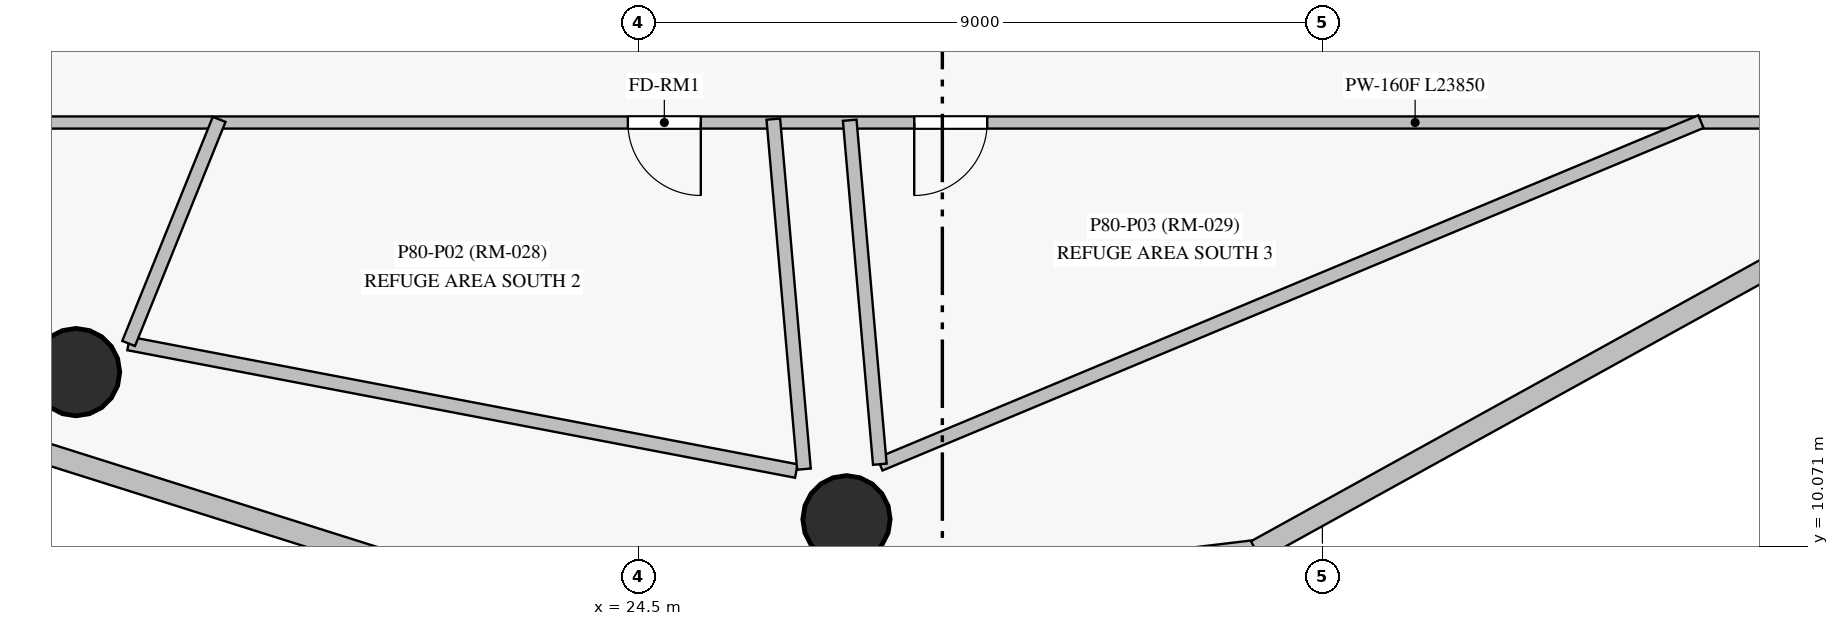
"""IFC4 building model, lengths in metres.
Left out: names, types, materials, properties, quantities, classifications, styles, units other than length and angle.
Written with IfcOpenShell. Run it as: python <this file> out.ifc"""

import sys

from ifc_helpers import new_model, si_unit, direction, frame, frame_2d, origin, origin_with_axes, origin_2d, place, context, subcontext, project, spatial, rectangle, circle, extrude, source, transform, mapped, element, fill, save


model = new_model("IFC4")
c1 = context("Model", 3, precision=1e-05, world=origin(), true_north=direction((0.0, 1.0)))
c2 = subcontext(c1, "Body", "Model", "MODEL_VIEW")
j1 = project(units=[si_unit("LENGTHUNIT", "METRE"), si_unit("PLANEANGLEUNIT", "RADIAN")], contexts=[c1])
p1 = place(None, origin())
s1 = spatial("IfcSite", under=j1, at=p1, CompositionType="ELEMENT")
p2 = place(p1, origin())
s2 = spatial("IfcBuilding", under=s1, at=p2, CompositionType="ELEMENT")
p3 = place(p2, frame((0.0, 0.0, 268.75)))
s3 = spatial("IfcBuildingStorey", under=s2, at=p3, CompositionType="ELEMENT", Elevation=268.75)
m1 = source(origin_with_axes(), c2, "Body", "SweptSolid", [
    extrude(circle(Radius=0.575, at=origin_2d()), origin(), (0.0, 0.0, 1.0), 4.65),
])
for number, where, z_axis, x_axis in (
    (1, (17.103, 12.366, 0.0), (0.0, 0.0, 1.0), (1.0, 0.0, 0.0)),
    (2, (27.239, 10.43, 0.0), (0.0, 0.0, 1.0), (1.0, 0.0, 0.0)),
):
    element("IfcColumn", number, at=place(p3, frame(where, z_axis=z_axis, x_axis=x_axis)), inside=s3, PredefinedType="COLUMN", context=c2, shape_type="MappedRepresentation", body=[
        mapped(m1, transform((0.0, 0.0, 0.0), scale=1.0)),
    ])
p4 = place(p3, frame((13.76, 12.225, 0.0), z_axis=(0.0, 0.0, 1.0), x_axis=(0.953609044317, -0.301047821113, 0.0)))
e3 = element("IfcWall", 3, at=p4, inside=s3, PredefinedType="SOLIDWALL", context=c2, shape_type="SweptSolid", body=[
    extrude(rectangle(XDim=10.769, YDim=0.28, at=frame_2d((5.384, 0.0))), origin(), (0.0, 0.0, 1.0), 4.375),
])
p5 = place(p3, frame((24.029, 8.983, 0.0), z_axis=(0.0, 0.0, 1.0), x_axis=(0.992838103252, 0.119467571879, 0.0)))
e4 = element("IfcWall", 4, at=p5, inside=s3, PredefinedType="SOLIDWALL", context=c2, shape_type="SweptSolid", body=[
    extrude(rectangle(XDim=8.661, YDim=0.28, at=frame_2d((4.33, 0.0))), origin(), (0.0, 0.0, 1.0), 4.375),
])
p6 = place(p3, frame((32.627, 10.018, 0.0), z_axis=(0.0, 0.0, 1.0), x_axis=(0.875279678708, 0.483617084107, 0.0)))
e5 = element("IfcWall", 5, at=p6, inside=s3, PredefinedType="SOLIDWALL", context=c2, shape_type="SweptSolid", body=[
    extrude(rectangle(XDim=11.836, YDim=0.28, at=frame_2d((5.918, 0.0))), origin(), (0.0, 0.0, 1.0), 4.375),
])
p7 = place(p3, frame((40.35, 15.65, 0.0), z_axis=(0.0, 0.0, 1.0), x_axis=(-1.0, 0.0, 0.0)))
e6 = element("IfcWall", 6, at=p7, inside=s3, PredefinedType="PARTITIONING", context=c2, shape_type="SweptSolid", body=[
    extrude(rectangle(XDim=23.85, YDim=0.16, at=frame_2d((11.925, 0.0))), origin(), (0.0, 0.0, 1.0), 3.475),
])
p8 = place(p7, frame((15.028, 0.0, 0.0)))
e7 = element("IfcOpeningElement", 7, at=p8, cuts=e6, PredefinedType="OPENING", context=c2, shape_type="SweptSolid", body=[
    extrude(rectangle(XDim=0.96, YDim=2.15, at=frame_2d((0.48, 1.075))), frame((0.0, 0.09, 0.0), z_axis=(0.0, -1.0, 0.0), x_axis=(1.0, 0.0, 0.0)), (0.0, 0.0, 1.0), 0.18),
])
p9 = place(p7, frame((11.26, 0.0, 0.0)))
e8 = element("IfcOpeningElement", 8, at=p9, cuts=e6, PredefinedType="OPENING", context=c2, shape_type="SweptSolid", body=[
    extrude(rectangle(XDim=0.96, YDim=2.15, at=frame_2d((0.48, 1.075))), frame((0.0, 0.09, 0.0), z_axis=(0.0, -1.0, 0.0), x_axis=(1.0, 0.0, 0.0)), (0.0, 0.0, 1.0), 0.18),
])
p10 = place(p3, frame((38.48, 15.662, 0.0), z_axis=(0.0, 0.0, 1.0), x_axis=(-0.922900953469, -0.38503743985, 0.0)))
e9 = element("IfcWall", 9, at=p10, inside=s3, PredefinedType="PARTITIONING", context=c2, shape_type="SweptSolid", body=[
    extrude(rectangle(XDim=11.705, YDim=0.18, at=frame_2d((5.853, 0.0))), origin(), (0.0, 0.0, 1.0), 3.475),
])
p11 = place(p3, frame((26.579, 11.065, 0.0), z_axis=(0.0, 0.0, 1.0), x_axis=(-0.982246697431, 0.187593777576, 0.0)))
e10 = element("IfcWall", 10, at=p11, inside=s3, PredefinedType="PARTITIONING", context=c2, shape_type="SweptSolid", body=[
    extrude(rectangle(XDim=8.943, YDim=0.18, at=frame_2d((4.472, 0.0))), origin(), (0.0, 0.0, 1.0), 3.475),
])
p12 = place(p3, frame((26.276, 15.695, 0.0), z_axis=(0.0, 0.0, 1.0), x_axis=(0.087201675946, -0.996190678391, 0.0)))
e11 = element("IfcWall", 11, at=p12, inside=s3, PredefinedType="PARTITIONING", context=c2, shape_type="SweptSolid", body=[
    extrude(rectangle(XDim=4.622, YDim=0.18, at=frame_2d((2.311, 0.0))), origin(), (0.0, 0.0, 1.0), 3.475),
])
p13 = place(p3, frame((27.677, 11.155, 0.0), z_axis=(0.0, 0.0, 1.0), x_axis=(-0.08723028893, 0.996188173335, 0.0)))
e12 = element("IfcWall", 12, at=p13, inside=s3, PredefinedType="PARTITIONING", context=c2, shape_type="SweptSolid", body=[
    extrude(rectangle(XDim=4.542, YDim=0.18, at=frame_2d((2.271, 0.0))), origin(), (0.0, 0.0, 1.0), 3.475),
])
p14 = place(p3, frame((17.794, 12.743, 0.0), z_axis=(0.0, 0.0, 1.0), x_axis=(0.3745518988, 0.92720595075, 0.0)))
e13 = element("IfcWall", 13, at=p14, inside=s3, PredefinedType="PARTITIONING", context=c2, shape_type="SweptSolid", body=[
    extrude(rectangle(XDim=3.18, YDim=0.18, at=frame_2d((1.59, 0.0))), origin(), (0.0, 0.0, 1.0), 3.475),
])
m2 = source(origin_with_axes(), c2, "Body", "SweptSolid", [
    extrude(rectangle(XDim=0.96, YDim=2.15, at=frame_2d((0.48, 1.075))), frame((0.0, 0.025, 0.0), z_axis=(0.0, -1.0, 0.0), x_axis=(1.0, 0.0, 0.0)), (0.0, 0.0, 1.0), 0.05),
])
p15 = place(p8, origin())
e14 = element("IfcDoor", 14, at=p15, inside=s3, OperationType="SINGLE_SWING_LEFT", PredefinedType="DOOR", context=c2, shape_type="MappedRepresentation", body=[
    mapped(m2, transform((0.0, 0.0, 0.0), scale=1.0)),
])
fill(e7, e14)
p16 = place(p9, origin())
e15 = element("IfcDoor", 15, at=p16, inside=s3, OperationType="SINGLE_SWING_RIGHT", PredefinedType="DOOR", context=c2, shape_type="MappedRepresentation", body=[
    mapped(m2, transform((0.0, 0.0, 0.0), scale=1.0)),
])
fill(e8, e15)
save(model, sys.argv[1])
